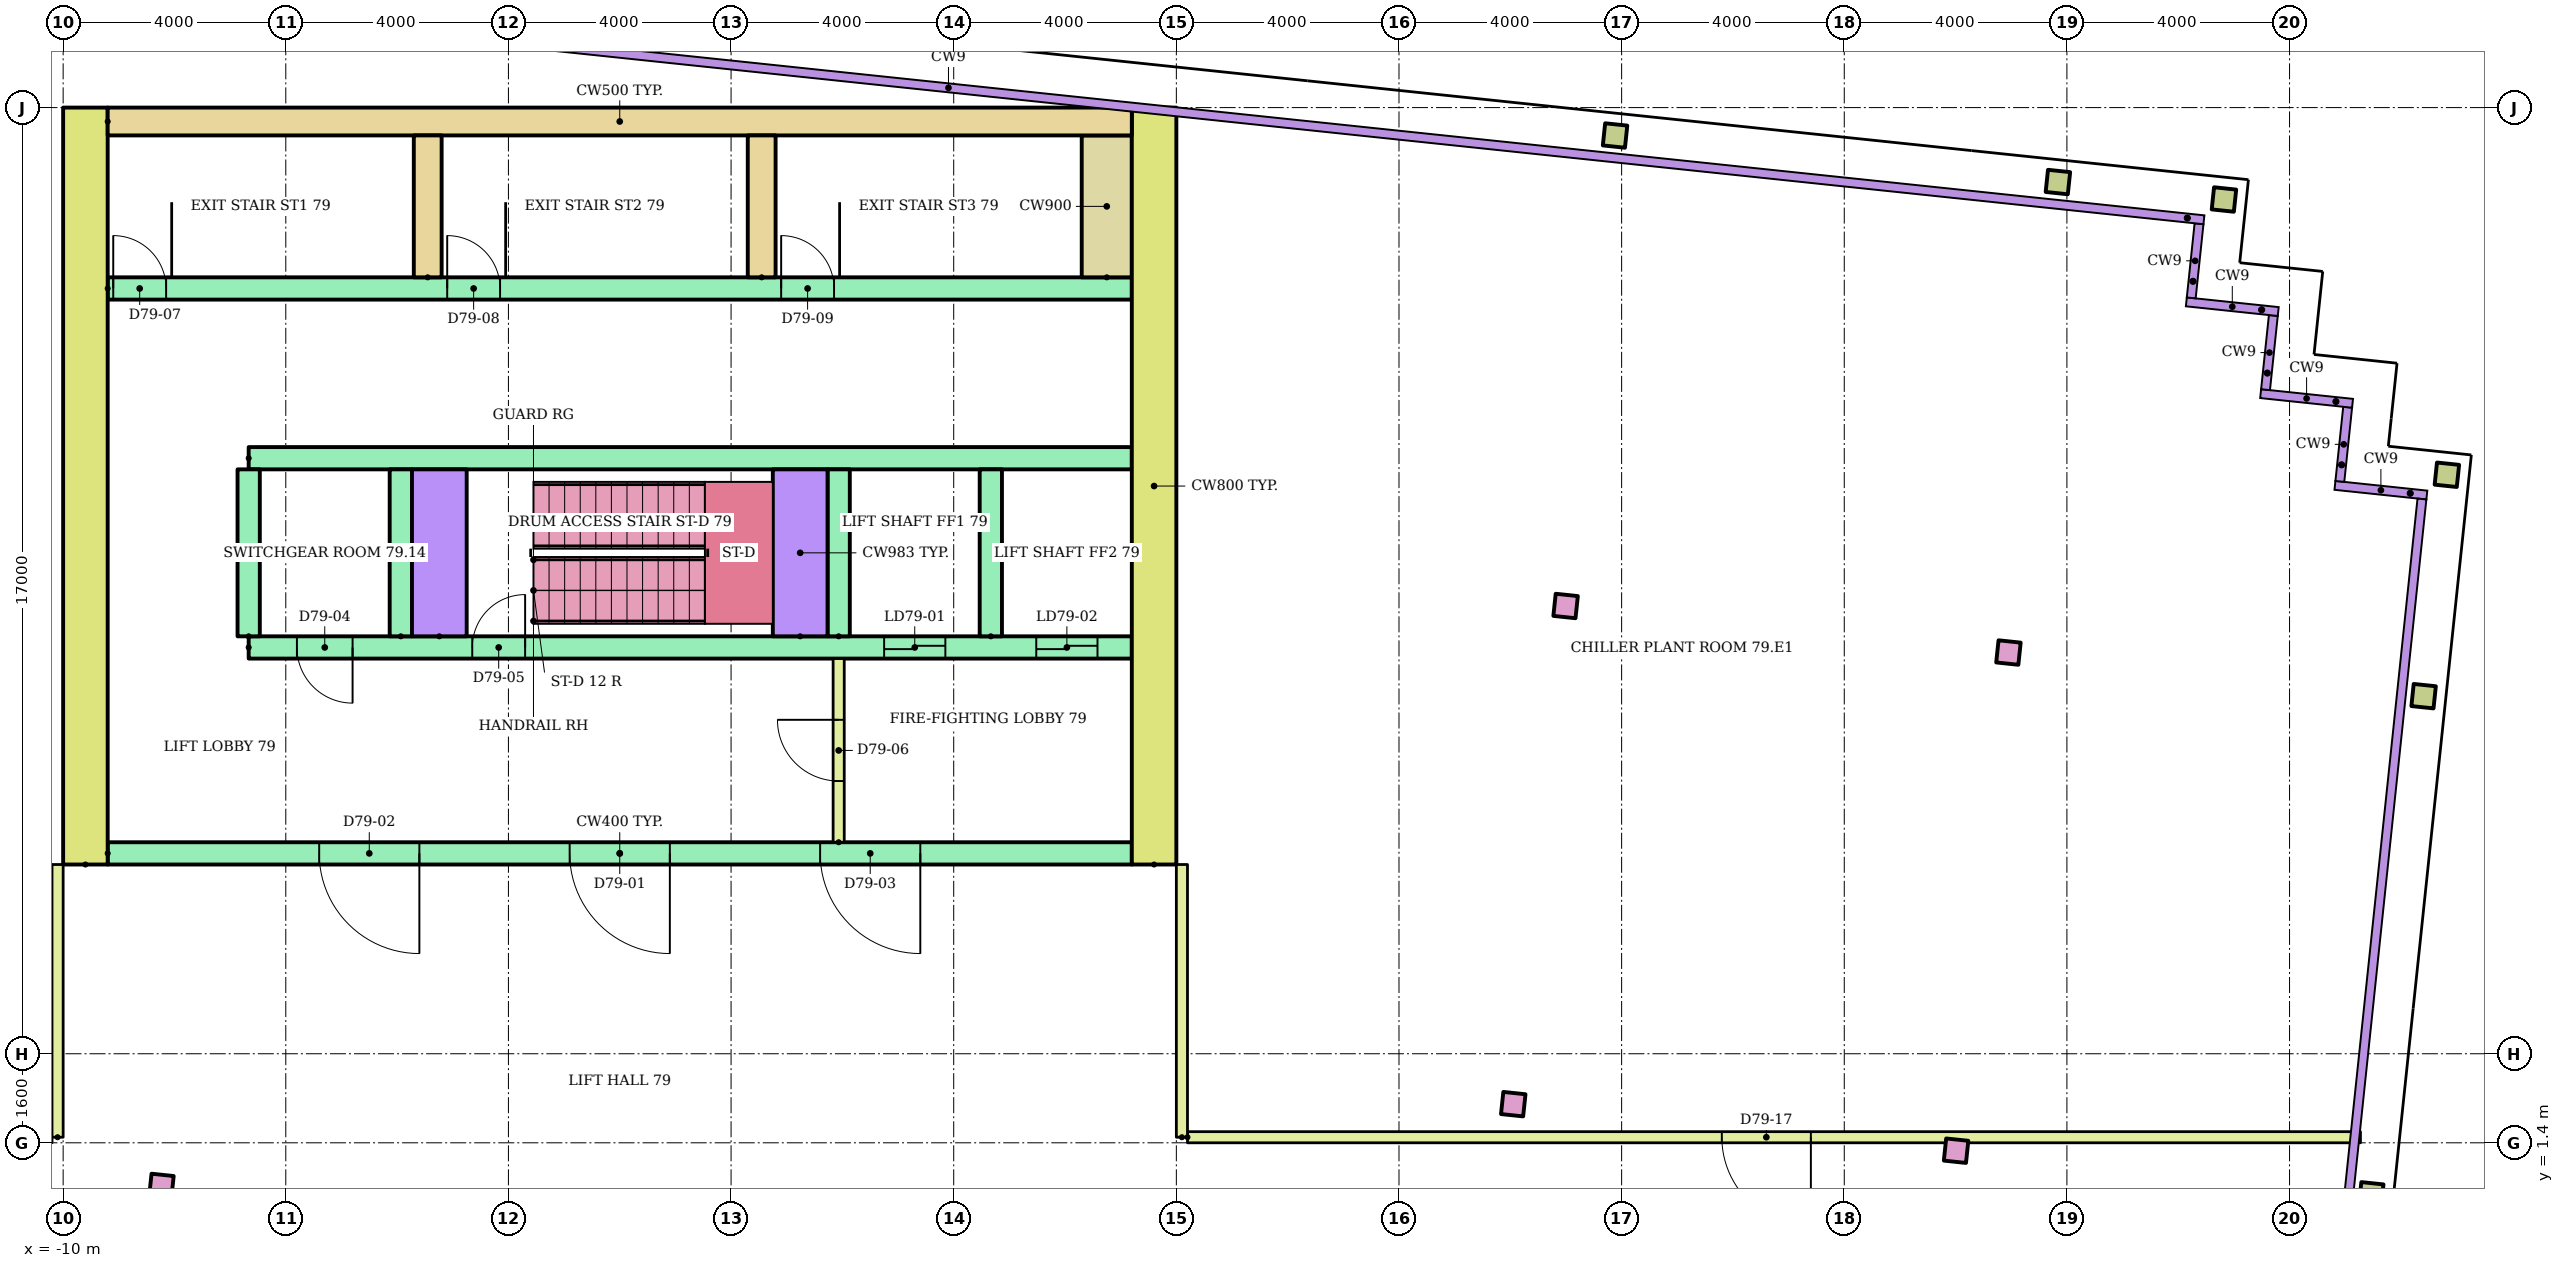
"""IFC4 building model, lengths in metres.
Left out: names, types, materials, properties, quantities, classifications, styles, units other than length and angle.
Written with IfcOpenShell. Run it as: python <this file> out.ifc"""

import sys

from ifc_helpers import new_model, si_unit, direction, frame, frame_2d, origin, origin_2d, place, context, subcontext, project, spatial, rectangle, hollow_rectangle, extrude, element, fill, save


model = new_model("IFC4")
c1 = context("Model", 3, precision=1e-05, world=origin(), true_north=direction((0.0, 1.0)))
c2 = subcontext(c1, "Body", "Model", "MODEL_VIEW")
j1 = project(units=[si_unit("LENGTHUNIT", "METRE"), si_unit("PLANEANGLEUNIT", "RADIAN")], contexts=[c1])
p1 = place(None, origin())
s1 = spatial("IfcSite", under=j1, at=p1, CompositionType="ELEMENT")
p2 = place(p1, origin())
s2 = spatial("IfcBuilding", under=s1, at=p2, CompositionType="ELEMENT")
p3 = place(p2, frame((0.0, 0.0, 309.2)))
s3 = spatial("IfcBuildingStorey", under=s2, at=p3, CompositionType="ELEMENT", Elevation=309.2)
for number, where, z_axis, x_axis in (
    (1, (-8.234, 0.625, 0.0), (0.0, 0.0, 1.0), (0.995, -0.105, 0.0)),
    (2, (16.053, 2.094, 0.0), (0.0, 0.0, 1.0), (0.995, -0.105, 0.0)),
    (3, (24.009, 1.258, 0.0), (0.0, 0.0, 1.0), (0.995, -0.105, 0.0)),
):
    element("IfcColumn", number, at=place(p3, frame(where, z_axis=z_axis, x_axis=x_axis)), inside=s3, PredefinedType="COLUMN", context=c2, shape_type="SweptSolid", body=[
        extrude(rectangle(XDim=0.4, YDim=0.4, at=origin_2d()), origin(), (0.0, 0.0, 1.0), 3.78),
    ])
p4 = place(p3, frame((31.468, 0.474, 0.0), z_axis=(0.0, 0.0, 1.0), x_axis=(0.994521895368, -0.104528463268, 0.0)))
e4 = element("IfcColumn", 4, at=p4, inside=s3, PredefinedType="COLUMN", context=c2, shape_type="SweptSolid", body=[
    extrude(hollow_rectangle(XDim=0.4, YDim=0.4, WallThickness=0.02, at=origin_2d()), origin(), (0.0, 0.0, 1.0), 3.78),
])
for number, where, z_axis, x_axis in (
    (5, (16.993, 11.045, 0.0), (0.0, 0.0, 1.0), (0.995, -0.105, 0.0)),
    (6, (24.95, 10.209, 0.0), (0.0, 0.0, 1.0), (0.995, -0.105, 0.0)),
):
    element("IfcColumn", number, at=place(p3, frame(where, z_axis=z_axis, x_axis=x_axis)), inside=s3, PredefinedType="COLUMN", context=c2, shape_type="SweptSolid", body=[
        extrude(rectangle(XDim=0.4, YDim=0.4, at=origin_2d()), origin(), (0.0, 0.0, 1.0), 3.78),
    ])
for number, where, z_axis, x_axis in (
    (7, (32.409, 9.425, 0.0), (0.0, 0.0, 1.0), (0.995, -0.105, 0.0)),
    (8, (32.827, 13.403, 0.0), (0.0, 0.0, 1.0), (0.995, -0.105, 0.0)),
    (9, (17.882, 19.498, 0.0), (0.0, 0.0, 1.0), (0.995, -0.105, 0.0)),
    (10, (25.838, 18.662, 0.0), (0.0, 0.0, 1.0), (0.995, -0.105, 0.0)),
    (11, (28.822, 18.349, 0.0), (0.0, 0.0, 1.0), (0.995, -0.105, 0.0)),
):
    element("IfcColumn", number, at=place(p3, frame(where, z_axis=z_axis, x_axis=x_axis)), inside=s3, PredefinedType="COLUMN", context=c2, shape_type="SweptSolid", body=[
        extrude(hollow_rectangle(XDim=0.4, YDim=0.4, WallThickness=0.02, at=origin_2d()), origin(), (0.0, 0.0, 1.0), 3.78),
    ])
for number, where, z_axis, x_axis in (
    (12, (-9.6, 6.4, 0.0), (0.0, 0.0, 1.0), (0.0, 1.0, 0.0)),
    (13, (9.6, 6.4, 0.0), (0.0, 0.0, 1.0), (0.0, 1.0, 0.0)),
):
    element("IfcWall", number, at=place(p3, frame(where, z_axis=z_axis, x_axis=x_axis)), inside=s3, PredefinedType="SHEAR", context=c2, shape_type="SweptSolid", body=[
        extrude(rectangle(XDim=13.6, YDim=0.8, at=frame_2d((6.8, 0.0))), origin(), (0.0, 0.0, 1.0), 3.78),
    ])
p5 = place(p3, frame((-9.2, 19.75, 0.0)))
e14 = element("IfcWall", 14, at=p5, inside=s3, PredefinedType="SHEAR", context=c2, shape_type="SweptSolid", body=[
    extrude(rectangle(XDim=18.4, YDim=0.5, at=frame_2d((9.2, 0.0))), origin(), (0.0, 0.0, 1.0), 3.78),
])
p6 = place(p3, frame((-9.2, 6.6, 0.0)))
e15 = element("IfcWall", 15, at=p6, inside=s3, PredefinedType="SHEAR", context=c2, shape_type="SweptSolid", body=[
    extrude(rectangle(XDim=18.4, YDim=0.4, at=frame_2d((9.2, 0.0))), origin(), (0.0, 0.0, 1.0), 3.78),
])
p7 = place(p6, frame((8.3, 0.0, 0.0)))
e16 = element("IfcOpeningElement", 16, at=p7, cuts=e15, PredefinedType="OPENING", context=c2, shape_type="SweptSolid", body=[
    extrude(rectangle(XDim=1.8, YDim=2.1, at=frame_2d((0.9, 1.05))), frame((0.0, 0.21, 0.0), z_axis=(0.0, -1.0, 0.0), x_axis=(1.0, 0.0, 0.0)), (0.0, 0.0, 1.0), 0.42),
])
p8 = place(p6, frame((3.8, 0.0, 0.0)))
e17 = element("IfcOpeningElement", 17, at=p8, cuts=e15, PredefinedType="OPENING", context=c2, shape_type="SweptSolid", body=[
    extrude(rectangle(XDim=1.8, YDim=2.1, at=frame_2d((0.9, 1.05))), frame((0.0, 0.21, 0.0), z_axis=(0.0, -1.0, 0.0), x_axis=(1.0, 0.0, 0.0)), (0.0, 0.0, 1.0), 0.42),
])
p9 = place(p6, frame((12.8, 0.0, 0.0)))
e18 = element("IfcOpeningElement", 18, at=p9, cuts=e15, PredefinedType="OPENING", context=c2, shape_type="SweptSolid", body=[
    extrude(rectangle(XDim=1.8, YDim=2.1, at=frame_2d((0.9, 1.05))), frame((0.0, 0.21, 0.0), z_axis=(0.0, -1.0, 0.0), x_axis=(1.0, 0.0, 0.0)), (0.0, 0.0, 1.0), 0.42),
])
p10 = place(p3, frame((-6.667, 10.3, 0.0)))
e19 = element("IfcWall", 19, at=p10, inside=s3, PredefinedType="SHEAR", context=c2, shape_type="SweptSolid", body=[
    extrude(rectangle(XDim=15.867, YDim=0.4, at=frame_2d((7.933, 0.0))), origin(), (0.0, 0.0, 1.0), 3.78),
])
p11 = place(p10, frame((11.417, 0.0, 0.0)))
e20 = element("IfcOpeningElement", 20, at=p11, cuts=e19, PredefinedType="OPENING", context=c2, shape_type="SweptSolid", body=[
    extrude(rectangle(XDim=1.1, YDim=2.1, at=frame_2d((0.55, 1.05))), frame((0.0, 0.21, 0.0), z_axis=(0.0, -1.0, 0.0), x_axis=(1.0, 0.0, 0.0)), (0.0, 0.0, 1.0), 0.42),
])
p12 = place(p10, frame((14.15, 0.0, 0.0)))
e21 = element("IfcOpeningElement", 21, at=p12, cuts=e19, PredefinedType="OPENING", context=c2, shape_type="SweptSolid", body=[
    extrude(rectangle(XDim=1.1, YDim=2.1, at=frame_2d((0.55, 1.05))), frame((0.0, 0.21, 0.0), z_axis=(0.0, -1.0, 0.0), x_axis=(1.0, 0.0, 0.0)), (0.0, 0.0, 1.0), 0.42),
])
p13 = place(p10, frame((0.867, 0.0, 0.0)))
e22 = element("IfcOpeningElement", 22, at=p13, cuts=e19, PredefinedType="OPENING", context=c2, shape_type="SweptSolid", body=[
    extrude(rectangle(XDim=1.0, YDim=2.1, at=frame_2d((0.5, 1.05))), frame((0.0, 0.21, 0.0), z_axis=(0.0, -1.0, 0.0), x_axis=(1.0, 0.0, 0.0)), (0.0, 0.0, 1.0), 0.42),
])
p14 = place(p10, frame((4.017, 0.0, 0.0)))
e23 = element("IfcOpeningElement", 23, at=p14, cuts=e19, PredefinedType="OPENING", context=c2, shape_type="SweptSolid", body=[
    extrude(rectangle(XDim=0.95, YDim=2.1, at=frame_2d((0.475, 1.05))), frame((0.0, 0.21, 0.0), z_axis=(0.0, -1.0, 0.0), x_axis=(1.0, 0.0, 0.0)), (0.0, 0.0, 1.0), 0.42),
])
p15 = place(p3, frame((-6.667, 13.7, 0.0)))
e24 = element("IfcWall", 24, at=p15, inside=s3, PredefinedType="SHEAR", context=c2, shape_type="SweptSolid", body=[
    extrude(rectangle(XDim=15.867, YDim=0.4, at=frame_2d((7.933, 0.0))), origin(), (0.0, 0.0, 1.0), 3.78),
])
for number, where, z_axis, x_axis in (
    (25, (-6.667, 10.5, 0.0), (0.0, 0.0, 1.0), (0.0, 1.0, 0.0)),
    (26, (-3.933, 10.5, 0.0), (0.0, 0.0, 1.0), (0.0, 1.0, 0.0)),
    (27, (3.933, 10.5, 0.0), (0.0, 0.0, 1.0), (0.0, 1.0, 0.0)),
    (28, (6.667, 10.5, 0.0), (0.0, 0.0, 1.0), (0.0, 1.0, 0.0)),
):
    element("IfcWall", number, at=place(p3, frame(where, z_axis=z_axis, x_axis=x_axis)), inside=s3, PredefinedType="SHEAR", context=c2, shape_type="SweptSolid", body=[
        extrude(rectangle(XDim=3.0, YDim=0.4, at=frame_2d((1.5, 0.0))), origin(), (0.0, 0.0, 1.0), 3.78),
    ])
for number, where, z_axis, x_axis in (
    (29, (-3.242, 10.5, 0.0), (0.0, 0.0, 1.0), (0.0, 1.0, 0.0)),
    (30, (3.242, 10.5, 0.0), (0.0, 0.0, 1.0), (0.0, 1.0, 0.0)),
):
    element("IfcWall", number, at=place(p3, frame(where, z_axis=z_axis, x_axis=x_axis)), inside=s3, PredefinedType="SHEAR", context=c2, shape_type="SweptSolid", body=[
        extrude(rectangle(XDim=3.0, YDim=0.983, at=frame_2d((1.5, 0.0))), origin(), (0.0, 0.0, 1.0), 3.78),
    ])
p16 = place(p3, frame((3.933, 6.8, 0.0), z_axis=(0.0, 0.0, 1.0), x_axis=(0.0, 1.0, 0.0)))
e31 = element("IfcWall", 31, at=p16, inside=s3, PredefinedType="PARTITIONING", context=c2, shape_type="SweptSolid", body=[
    extrude(rectangle(XDim=3.3, YDim=0.2, at=frame_2d((1.65, 0.0))), origin(), (0.0, 0.0, 1.0), 3.78),
])
p17 = place(p16, frame((1.1, 0.0, 0.0)))
e32 = element("IfcOpeningElement", 32, at=p17, cuts=e31, PredefinedType="OPENING", context=c2, shape_type="SweptSolid", body=[
    extrude(rectangle(XDim=1.1, YDim=2.1, at=frame_2d((0.55, 1.05))), frame((0.0, 0.11, 0.0), z_axis=(0.0, -1.0, 0.0), x_axis=(1.0, 0.0, 0.0)), (0.0, 0.0, 1.0), 0.22),
])
p18 = place(p3, frame((-9.2, 16.75, 0.0)))
e33 = element("IfcWall", 33, at=p18, inside=s3, PredefinedType="SHEAR", context=c2, shape_type="SweptSolid", body=[
    extrude(rectangle(XDim=18.4, YDim=0.4, at=frame_2d((9.2, 0.0))), origin(), (0.0, 0.0, 1.0), 3.78),
])
p19 = place(p18, frame((0.1, 0.0, 0.0)))
e34 = element("IfcOpeningElement", 34, at=p19, cuts=e33, PredefinedType="OPENING", context=c2, shape_type="SweptSolid", body=[
    extrude(rectangle(XDim=0.95, YDim=2.1, at=frame_2d((0.475, 1.05))), frame((0.0, 0.21, 0.0), z_axis=(0.0, -1.0, 0.0), x_axis=(1.0, 0.0, 0.0)), (0.0, 0.0, 1.0), 0.42),
])
p20 = place(p18, frame((6.1, 0.0, 0.0)))
e35 = element("IfcOpeningElement", 35, at=p20, cuts=e33, PredefinedType="OPENING", context=c2, shape_type="SweptSolid", body=[
    extrude(rectangle(XDim=0.95, YDim=2.1, at=frame_2d((0.475, 1.05))), frame((0.0, 0.21, 0.0), z_axis=(0.0, -1.0, 0.0), x_axis=(1.0, 0.0, 0.0)), (0.0, 0.0, 1.0), 0.42),
])
p21 = place(p18, frame((12.1, 0.0, 0.0)))
e36 = element("IfcOpeningElement", 36, at=p21, cuts=e33, PredefinedType="OPENING", context=c2, shape_type="SweptSolid", body=[
    extrude(rectangle(XDim=0.95, YDim=2.1, at=frame_2d((0.475, 1.05))), frame((0.0, 0.21, 0.0), z_axis=(0.0, -1.0, 0.0), x_axis=(1.0, 0.0, 0.0)), (0.0, 0.0, 1.0), 0.42),
])
for number, where, z_axis, x_axis in (
    (37, (-3.45, 16.95, 0.0), (0.0, 0.0, 1.0), (0.0, 1.0, 0.0)),
    (38, (2.55, 16.95, 0.0), (0.0, 0.0, 1.0), (0.0, 1.0, 0.0)),
):
    element("IfcWall", number, at=place(p3, frame(where, z_axis=z_axis, x_axis=x_axis)), inside=s3, PredefinedType="SHEAR", context=c2, shape_type="SweptSolid", body=[
        extrude(rectangle(XDim=2.55, YDim=0.5, at=frame_2d((1.275, 0.0))), origin(), (0.0, 0.0, 1.0), 3.78),
    ])
p22 = place(p3, frame((8.75, 16.95, 0.0), z_axis=(0.0, 0.0, 1.0), x_axis=(0.0, 1.0, 0.0)))
e39 = element("IfcWall", 39, at=p22, inside=s3, PredefinedType="SHEAR", context=c2, shape_type="SweptSolid", body=[
    extrude(rectangle(XDim=2.55, YDim=0.9, at=frame_2d((1.275, 0.0))), origin(), (0.0, 0.0, 1.0), 3.78),
])
p23 = place(p3, frame((10.2, 1.5, 0.0)))
e40 = element("IfcWall", 40, at=p23, inside=s3, PredefinedType="PARTITIONING", context=c2, shape_type="SweptSolid", body=[
    extrude(rectangle(XDim=21.074, YDim=0.2, at=frame_2d((10.537, 0.0))), origin(), (0.0, 0.0, 1.0), 3.78),
])
p24 = place(p23, frame((9.6, 0.0, 0.0)))
e41 = element("IfcOpeningElement", 41, at=p24, cuts=e40, PredefinedType="OPENING", context=c2, shape_type="SweptSolid", body=[
    extrude(rectangle(XDim=1.6, YDim=2.4, at=frame_2d((0.8, 1.2))), frame((0.0, 0.11, 0.0), z_axis=(0.0, -1.0, 0.0), x_axis=(1.0, 0.0, 0.0)), (0.0, 0.0, 1.0), 0.22),
])
for number, where, z_axis, x_axis in (
    (42, (-10.1, 1.5, 0.0), (0.0, 0.0, 1.0), (0.0, 1.0, 0.0)),
    (43, (10.1, 1.5, 0.0), (0.0, 0.0, 1.0), (0.0, 1.0, 0.0)),
):
    element("IfcWall", number, at=place(p3, frame(where, z_axis=z_axis, x_axis=x_axis)), inside=s3, PredefinedType="PARTITIONING", context=c2, shape_type="SweptSolid", body=[
        extrude(rectangle(XDim=4.9, YDim=0.2, at=frame_2d((2.45, 0.0))), origin(), (0.0, 0.0, 1.0), 3.78),
    ])
p25 = place(p7, frame((1.8, 0.0, 0.0), z_axis=(0.0, 0.0, 1.0), x_axis=(-1.0, 0.0, 0.0)))
e44 = element("IfcDoor", 44, at=p25, inside=s3, OperationType="DOUBLE_DOOR_SINGLE_SWING", PredefinedType="DOOR", context=c2, shape_type="SweptSolid", body=[
    extrude(rectangle(XDim=1.8, YDim=2.1, at=frame_2d((0.9, 1.05))), frame((0.0, 0.025, 0.0), z_axis=(0.0, -1.0, 0.0), x_axis=(1.0, 0.0, 0.0)), (0.0, 0.0, 1.0), 0.05),
])
fill(e16, e44)
p26 = place(p8, frame((1.8, 0.0, 0.0), z_axis=(0.0, 0.0, 1.0), x_axis=(-1.0, 0.0, 0.0)))
e45 = element("IfcDoor", 45, at=p26, inside=s3, OperationType="DOUBLE_DOOR_SINGLE_SWING", PredefinedType="DOOR", context=c2, shape_type="SweptSolid", body=[
    extrude(rectangle(XDim=1.8, YDim=2.1, at=frame_2d((0.9, 1.05))), frame((0.0, 0.025, 0.0), z_axis=(0.0, -1.0, 0.0), x_axis=(1.0, 0.0, 0.0)), (0.0, 0.0, 1.0), 0.05),
])
fill(e17, e45)
p27 = place(p9, frame((1.8, 0.0, 0.0), z_axis=(0.0, 0.0, 1.0), x_axis=(-1.0, 0.0, 0.0)))
e46 = element("IfcDoor", 46, at=p27, inside=s3, OperationType="DOUBLE_DOOR_SINGLE_SWING", PredefinedType="DOOR", context=c2, shape_type="SweptSolid", body=[
    extrude(rectangle(XDim=1.8, YDim=2.1, at=frame_2d((0.9, 1.05))), frame((0.0, 0.025, 0.0), z_axis=(0.0, -1.0, 0.0), x_axis=(1.0, 0.0, 0.0)), (0.0, 0.0, 1.0), 0.05),
])
fill(e18, e46)
p28 = place(p11, origin())
e47 = element("IfcDoor", 47, at=p28, inside=s3, OperationType="SLIDING_TO_LEFT", PredefinedType="DOOR", context=c2, shape_type="SweptSolid", body=[
    extrude(rectangle(XDim=1.1, YDim=2.1, at=frame_2d((0.55, 1.05))), frame((0.0, 0.025, 0.0), z_axis=(0.0, -1.0, 0.0), x_axis=(1.0, 0.0, 0.0)), (0.0, 0.0, 1.0), 0.05),
])
fill(e20, e47)
p29 = place(p12, origin())
e48 = element("IfcDoor", 48, at=p29, inside=s3, OperationType="SLIDING_TO_LEFT", PredefinedType="DOOR", context=c2, shape_type="SweptSolid", body=[
    extrude(rectangle(XDim=1.1, YDim=2.1, at=frame_2d((0.55, 1.05))), frame((0.0, 0.025, 0.0), z_axis=(0.0, -1.0, 0.0), x_axis=(1.0, 0.0, 0.0)), (0.0, 0.0, 1.0), 0.05),
])
fill(e21, e48)
p30 = place(p13, frame((1.0, 0.0, 0.0), z_axis=(0.0, 0.0, 1.0), x_axis=(-1.0, 0.0, 0.0)))
e49 = element("IfcDoor", 49, at=p30, inside=s3, OperationType="SINGLE_SWING_RIGHT", PredefinedType="DOOR", context=c2, shape_type="SweptSolid", body=[
    extrude(rectangle(XDim=1.0, YDim=2.1, at=frame_2d((0.5, 1.05))), frame((0.0, 0.025, 0.0), z_axis=(0.0, -1.0, 0.0), x_axis=(1.0, 0.0, 0.0)), (0.0, 0.0, 1.0), 0.05),
])
fill(e22, e49)
p31 = place(p14, origin())
e50 = element("IfcDoor", 50, at=p31, inside=s3, OperationType="SINGLE_SWING_RIGHT", PredefinedType="DOOR", context=c2, shape_type="SweptSolid", body=[
    extrude(rectangle(XDim=0.95, YDim=2.1, at=frame_2d((0.475, 1.05))), frame((0.0, 0.025, 0.0), z_axis=(0.0, -1.0, 0.0), x_axis=(1.0, 0.0, 0.0)), (0.0, 0.0, 1.0), 0.05),
])
fill(e23, e50)
p32 = place(p17, origin())
e51 = element("IfcDoor", 51, at=p32, inside=s3, OperationType="SINGLE_SWING_RIGHT", PredefinedType="DOOR", context=c2, shape_type="SweptSolid", body=[
    extrude(rectangle(XDim=1.1, YDim=2.1, at=frame_2d((0.55, 1.05))), frame((0.0, 0.025, 0.0), z_axis=(0.0, -1.0, 0.0), x_axis=(1.0, 0.0, 0.0)), (0.0, 0.0, 1.0), 0.05),
])
fill(e32, e51)
p33 = place(p19, origin())
e52 = element("IfcDoor", 52, at=p33, inside=s3, OperationType="SINGLE_SWING_LEFT", PredefinedType="DOOR", context=c2, shape_type="SweptSolid", body=[
    extrude(rectangle(XDim=0.95, YDim=2.1, at=frame_2d((0.475, 1.05))), frame((0.0, 0.025, 0.0), z_axis=(0.0, -1.0, 0.0), x_axis=(1.0, 0.0, 0.0)), (0.0, 0.0, 1.0), 0.05),
])
fill(e34, e52)
p34 = place(p20, origin())
e53 = element("IfcDoor", 53, at=p34, inside=s3, OperationType="SINGLE_SWING_LEFT", PredefinedType="DOOR", context=c2, shape_type="SweptSolid", body=[
    extrude(rectangle(XDim=0.95, YDim=2.1, at=frame_2d((0.475, 1.05))), frame((0.0, 0.025, 0.0), z_axis=(0.0, -1.0, 0.0), x_axis=(1.0, 0.0, 0.0)), (0.0, 0.0, 1.0), 0.05),
])
fill(e35, e53)
p35 = place(p21, origin())
e54 = element("IfcDoor", 54, at=p35, inside=s3, OperationType="SINGLE_SWING_LEFT", PredefinedType="DOOR", context=c2, shape_type="SweptSolid", body=[
    extrude(rectangle(XDim=0.95, YDim=2.1, at=frame_2d((0.475, 1.05))), frame((0.0, 0.025, 0.0), z_axis=(0.0, -1.0, 0.0), x_axis=(1.0, 0.0, 0.0)), (0.0, 0.0, 1.0), 0.05),
])
fill(e36, e54)
p36 = place(p24, frame((1.6, 0.0, 0.0), z_axis=(0.0, 0.0, 1.0), x_axis=(-1.0, 0.0, 0.0)))
e55 = element("IfcDoor", 55, at=p36, inside=s3, OperationType="DOUBLE_DOOR_SINGLE_SWING", PredefinedType="DOOR", context=c2, shape_type="SweptSolid", body=[
    extrude(rectangle(XDim=1.6, YDim=2.4, at=frame_2d((0.8, 1.2))), frame((0.0, 0.025, 0.0), z_axis=(0.0, -1.0, 0.0), x_axis=(1.0, 0.0, 0.0)), (0.0, 0.0, 1.0), 0.05),
])
fill(e41, e55)
save(model, sys.argv[1])
